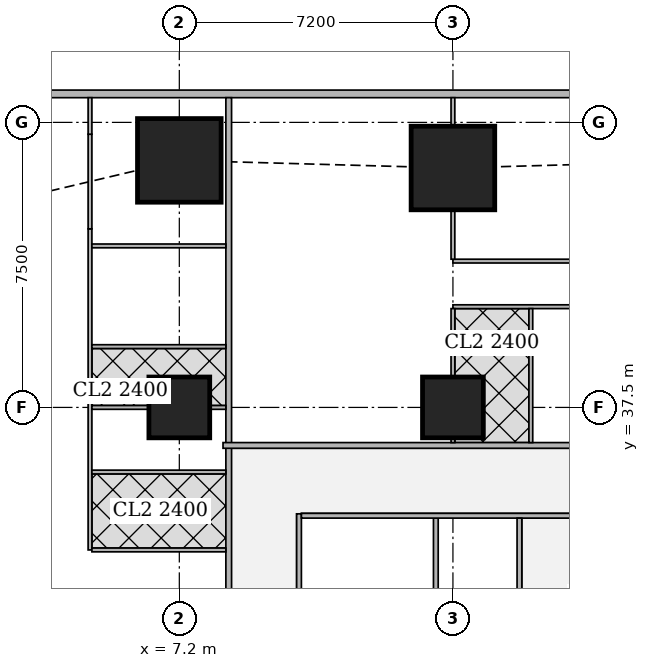
"""IFC4 building model, lengths in metres.
Left out: names, types, materials, properties, quantities, classifications, styles, units other than length and angle.
Written with IfcOpenShell. Run it as: python <this file> out.ifc"""

import sys

from ifc_helpers import new_model, si_unit, direction, frame, frame_2d, origin, origin_2d, place, context, subcontext, project, spatial, rectangle, extrude, element, fill, save


model = new_model("IFC4")
c1 = context("Model", 3, precision=1e-05, world=origin(), true_north=direction((0.0, 1.0)))
c2 = subcontext(c1, "Body", "Model", "MODEL_VIEW")
j1 = project(units=[si_unit("LENGTHUNIT", "METRE"), si_unit("PLANEANGLEUNIT", "RADIAN")], contexts=[c1])
p1 = place(None, origin())
s1 = spatial("IfcSite", under=j1, at=p1, CompositionType="ELEMENT")
p2 = place(p1, origin())
s2 = spatial("IfcBuilding", under=s1, at=p2, CompositionType="ELEMENT")
p3 = place(p2, frame((0.0, 0.0, 89.15)))
s3 = spatial("IfcBuildingStorey", under=s2, at=p3, CompositionType="ELEMENT", Elevation=89.15)
for number, where, z_axis, x_axis in (
    (1, (7.2, 37.5, 0.0), (0.0, 0.0, 1.0), (1.0, 0.0, 0.0)),
    (2, (14.4, 37.5, 0.0), (0.0, 0.0, 1.0), (1.0, 0.0, 0.0)),
):
    element("IfcColumn", number, at=place(p3, frame(where, z_axis=z_axis, x_axis=x_axis)), inside=s3, PredefinedType="COLUMN", context=c2, shape_type="SweptSolid", body=[
        extrude(rectangle(XDim=1.6, YDim=1.6, at=origin_2d()), origin(), (0.0, 0.0, 1.0), 3.75),
    ])
for number, where, z_axis, x_axis in (
    (3, (7.2, 44.0, 0.0), (0.0, 0.0, 1.0), (1.0, 0.0, 0.0)),
    (4, (14.4, 43.8, 0.0), (0.0, 0.0, 1.0), (1.0, 0.0, 0.0)),
):
    element("IfcColumn", number, at=place(p3, frame(where, z_axis=z_axis, x_axis=x_axis)), inside=s3, PredefinedType="COLUMN", context=c2, shape_type="SweptSolid", body=[
        extrude(rectangle(XDim=2.2, YDim=2.2, at=origin_2d()), origin(), (0.0, 0.0, 1.0), 3.75),
    ])
p4 = place(p3, frame((40.106, 45.75, 0.0), z_axis=(0.0, 0.0, 1.0), x_axis=(-1.0, 0.0, 0.0)))
e5 = element("IfcWall", 5, at=p4, inside=s3, PredefinedType="SOLIDWALL", context=c2, shape_type="SweptSolid", body=[
    extrude(rectangle(XDim=37.943, YDim=0.2, at=frame_2d((18.971, 0.0))), origin(), (0.0, 0.0, 1.0), 3.5),
])
p5 = place(p4, frame((8.606, 0.0, 0.9)))
e6 = element("IfcOpeningElement", 6, at=p5, cuts=e5, PredefinedType="OPENING", context=c2, shape_type="SweptSolid", body=[
    extrude(rectangle(XDim=1.8, YDim=1.5, at=frame_2d((0.9, 0.75))), frame((0.0, 0.11, 0.0), z_axis=(0.0, -1.0, 0.0), x_axis=(1.0, 0.0, 0.0)), (0.0, 0.0, 1.0), 0.22),
])
p6 = place(p4, frame((12.206, 0.0, 0.9)))
e7 = element("IfcOpeningElement", 7, at=p6, cuts=e5, PredefinedType="OPENING", context=c2, shape_type="SweptSolid", body=[
    extrude(rectangle(XDim=1.8, YDim=1.5, at=frame_2d((0.9, 0.75))), frame((0.0, 0.11, 0.0), z_axis=(0.0, -1.0, 0.0), x_axis=(1.0, 0.0, 0.0)), (0.0, 0.0, 1.0), 0.22),
])
p7 = place(p4, frame((15.806, 0.0, 0.9)))
e8 = element("IfcOpeningElement", 8, at=p7, cuts=e5, PredefinedType="OPENING", context=c2, shape_type="SweptSolid", body=[
    extrude(rectangle(XDim=1.8, YDim=1.5, at=frame_2d((0.9, 0.75))), frame((0.0, 0.11, 0.0), z_axis=(0.0, -1.0, 0.0), x_axis=(1.0, 0.0, 0.0)), (0.0, 0.0, 1.0), 0.22),
])
p8 = place(p4, frame((19.406, 0.0, 0.9)))
e9 = element("IfcOpeningElement", 9, at=p8, cuts=e5, PredefinedType="OPENING", context=c2, shape_type="SweptSolid", body=[
    extrude(rectangle(XDim=1.8, YDim=1.5, at=frame_2d((0.9, 0.75))), frame((0.0, 0.11, 0.0), z_axis=(0.0, -1.0, 0.0), x_axis=(1.0, 0.0, 0.0)), (0.0, 0.0, 1.0), 0.22),
])
p9 = place(p4, frame((23.006, 0.0, 0.9)))
e10 = element("IfcOpeningElement", 10, at=p9, cuts=e5, PredefinedType="OPENING", context=c2, shape_type="SweptSolid", body=[
    extrude(rectangle(XDim=1.8, YDim=1.5, at=frame_2d((0.9, 0.75))), frame((0.0, 0.11, 0.0), z_axis=(0.0, -1.0, 0.0), x_axis=(1.0, 0.0, 0.0)), (0.0, 0.0, 1.0), 0.22),
])
p10 = place(p4, frame((26.606, 0.0, 0.9)))
e11 = element("IfcOpeningElement", 11, at=p10, cuts=e5, PredefinedType="OPENING", context=c2, shape_type="SweptSolid", body=[
    extrude(rectangle(XDim=1.8, YDim=1.5, at=frame_2d((0.9, 0.75))), frame((0.0, 0.11, 0.0), z_axis=(0.0, -1.0, 0.0), x_axis=(1.0, 0.0, 0.0)), (0.0, 0.0, 1.0), 0.22),
])
p11 = place(p3, frame((8.5, -0.65, 0.0), z_axis=(0.0, 0.0, 1.0), x_axis=(0.0, 1.0, 0.0)))
e12 = element("IfcWall", 12, at=p11, inside=s3, PredefinedType="SOLIDWALL", context=c2, shape_type="SweptSolid", body=[
    extrude(rectangle(XDim=46.3, YDim=0.15, at=frame_2d((23.15, 0.0))), origin(), (0.0, 0.0, 1.0), 2.2),
])
p12 = place(p11, frame((9.525, 0.0, 0.0)))
e13 = element("IfcOpeningElement", 13, at=p12, cuts=e12, PredefinedType="OPENING", context=c2, shape_type="SweptSolid", body=[
    extrude(rectangle(XDim=1.0, YDim=2.1, at=frame_2d((0.5, 1.05))), frame((0.0, 0.085, 0.0), z_axis=(0.0, -1.0, 0.0), x_axis=(1.0, 0.0, 0.0)), (0.0, 0.0, 1.0), 0.17),
])
p13 = place(p11, frame((13.275, 0.0, 0.0)))
e14 = element("IfcOpeningElement", 14, at=p13, cuts=e12, PredefinedType="OPENING", context=c2, shape_type="SweptSolid", body=[
    extrude(rectangle(XDim=1.0, YDim=2.1, at=frame_2d((0.5, 1.05))), frame((0.0, 0.085, 0.0), z_axis=(0.0, -1.0, 0.0), x_axis=(1.0, 0.0, 0.0)), (0.0, 0.0, 1.0), 0.17),
])
p14 = place(p11, frame((20.775, 0.0, 0.0)))
e15 = element("IfcOpeningElement", 15, at=p14, cuts=e12, PredefinedType="OPENING", context=c2, shape_type="SweptSolid", body=[
    extrude(rectangle(XDim=1.0, YDim=2.1, at=frame_2d((0.5, 1.05))), frame((0.0, 0.085, 0.0), z_axis=(0.0, -1.0, 0.0), x_axis=(1.0, 0.0, 0.0)), (0.0, 0.0, 1.0), 0.17),
])
p15 = place(p11, frame((32.025, 0.0, 0.0)))
e16 = element("IfcOpeningElement", 16, at=p15, cuts=e12, PredefinedType="OPENING", context=c2, shape_type="SweptSolid", body=[
    extrude(rectangle(XDim=1.0, YDim=2.1, at=frame_2d((0.5, 1.05))), frame((0.0, 0.085, 0.0), z_axis=(0.0, -1.0, 0.0), x_axis=(1.0, 0.0, 0.0)), (0.0, 0.0, 1.0), 0.17),
])
p16 = place(p3, frame((8.35, 36.5, 0.0), z_axis=(0.0, 0.0, 1.0), x_axis=(1.0, 0.0, 0.0)))
e17 = element("IfcWall", 17, at=p16, inside=s3, PredefinedType="SOLIDWALL", context=c2, shape_type="SweptSolid", body=[
    extrude(rectangle(XDim=26.415, YDim=0.15, at=frame_2d((13.208, 0.0))), origin(), (0.0, 0.0, 1.0), 3.5),
])
p17 = place(p16, frame((2.6, 0.0, 0.0)))
e18 = element("IfcOpeningElement", 18, at=p17, cuts=e17, PredefinedType="OPENING", context=c2, shape_type="SweptSolid", body=[
    extrude(rectangle(XDim=1.0, YDim=2.1, at=frame_2d((0.5, 1.05))), frame((0.0, 0.085, 0.0), z_axis=(0.0, -1.0, 0.0), x_axis=(1.0, 0.0, 0.0)), (0.0, 0.0, 1.0), 0.17),
])
p18 = place(p16, frame((10.75, 0.0, 0.0)))
e19 = element("IfcOpeningElement", 19, at=p18, cuts=e17, PredefinedType="OPENING", context=c2, shape_type="SweptSolid", body=[
    extrude(rectangle(XDim=1.0, YDim=2.1, at=frame_2d((0.5, 1.05))), frame((0.0, 0.085, 0.0), z_axis=(0.0, -1.0, 0.0), x_axis=(1.0, 0.0, 0.0)), (0.0, 0.0, 1.0), 0.17),
])
p19 = place(p16, frame((18.007, 0.0, 0.0)))
e20 = element("IfcOpeningElement", 20, at=p19, cuts=e17, PredefinedType="OPENING", context=c2, shape_type="SweptSolid", body=[
    extrude(rectangle(XDim=1.0, YDim=2.1, at=frame_2d((0.5, 1.05))), frame((0.0, 0.085, 0.0), z_axis=(0.0, -1.0, 0.0), x_axis=(1.0, 0.0, 0.0)), (0.0, 0.0, 1.0), 0.17),
])
p20 = place(p3, frame((4.85, 33.75, 0.0), z_axis=(0.0, 0.0, 1.0), x_axis=(0.0, 1.0, 0.0)))
e21 = element("IfcWall", 21, at=p20, inside=s3, PredefinedType="PARTITIONING", context=c2, shape_type="SweptSolid", body=[
    extrude(rectangle(XDim=8.449, YDim=0.1, at=frame_2d((4.225, 0.0))), origin(), (0.0, 0.0, 1.0), 3.5),
])
p21 = place(p20, frame((0.575, 0.0, 0.0)))
e22 = element("IfcOpeningElement", 22, at=p21, cuts=e21, PredefinedType="OPENING", context=c2, shape_type="SweptSolid", body=[
    extrude(rectangle(XDim=0.9, YDim=2.1, at=frame_2d((0.45, 1.05))), frame((0.0, 0.06, 0.0), z_axis=(0.0, -1.0, 0.0), x_axis=(1.0, 0.0, 0.0)), (0.0, 0.0, 1.0), 0.12),
])
p22 = place(p20, frame((4.1, 0.0, 0.0)))
e23 = element("IfcOpeningElement", 23, at=p22, cuts=e21, PredefinedType="OPENING", context=c2, shape_type="SweptSolid", body=[
    extrude(rectangle(XDim=0.9, YDim=2.1, at=frame_2d((0.45, 1.05))), frame((0.0, 0.06, 0.0), z_axis=(0.0, -1.0, 0.0), x_axis=(1.0, 0.0, 0.0)), (0.0, 0.0, 1.0), 0.12),
])
p23 = place(p20, frame((2.45, 0.0, 0.0)))
e24 = element("IfcOpeningElement", 24, at=p23, cuts=e21, PredefinedType="OPENING", context=c2, shape_type="SweptSolid", body=[
    extrude(rectangle(XDim=0.9, YDim=2.1, at=frame_2d((0.45, 1.05))), frame((0.0, 0.06, 0.0), z_axis=(0.0, -1.0, 0.0), x_axis=(1.0, 0.0, 0.0)), (0.0, 0.0, 1.0), 0.12),
])
p24 = place(p20, frame((5.975, 0.0, 0.0)))
e25 = element("IfcOpeningElement", 25, at=p24, cuts=e21, PredefinedType="OPENING", context=c2, shape_type="SweptSolid", body=[
    extrude(rectangle(XDim=0.9, YDim=2.1, at=frame_2d((0.45, 1.05))), frame((0.0, 0.06, 0.0), z_axis=(0.0, -1.0, 0.0), x_axis=(1.0, 0.0, 0.0)), (0.0, 0.0, 1.0), 0.12),
])
p25 = place(p3, frame((4.85, 42.199, 0.0), z_axis=(0.0, 0.0, 1.0), x_axis=(0.0, 1.0, 0.0)))
e26 = element("IfcWall", 26, at=p25, inside=s3, PredefinedType="PARTITIONING", context=c2, shape_type="SweptSolid", body=[
    extrude(rectangle(XDim=2.49, YDim=0.1, at=frame_2d((1.245, 0.0))), origin(), (0.0, 0.0, 1.0), 2.05),
])
p26 = place(p3, frame((4.85, 44.689, 0.0), z_axis=(0.0, 0.0, 1.0), x_axis=(0.0, 1.0, 0.0)))
e27 = element("IfcWall", 27, at=p26, inside=s3, PredefinedType="PARTITIONING", context=c2, shape_type="SweptSolid", body=[
    extrude(rectangle(XDim=0.961, YDim=0.1, at=frame_2d((0.48, 0.0))), origin(), (0.0, 0.0, 1.0), 3.5),
])
p27 = place(p3, frame((4.9, 33.75, 0.0), z_axis=(0.0, 0.0, 1.0), x_axis=(1.0, 0.0, 0.0)))
e28 = element("IfcWall", 28, at=p27, inside=s3, PredefinedType="PARTITIONING", context=c2, shape_type="SweptSolid", body=[
    extrude(rectangle(XDim=3.525, YDim=0.1, at=frame_2d((1.763, 0.0))), origin(), (0.0, 0.0, 1.0), 3.5),
])
p28 = place(p3, frame((4.9, 37.5, 0.0), z_axis=(0.0, 0.0, 1.0), x_axis=(1.0, 0.0, 0.0)))
e29 = element("IfcWall", 29, at=p28, inside=s3, PredefinedType="PARTITIONING", context=c2, shape_type="SweptSolid", body=[
    extrude(rectangle(XDim=1.499, YDim=0.1, at=frame_2d((0.75, 0.0))), origin(), (0.0, 0.0, 1.0), 3.5),
])
p29 = place(p3, frame((8.001, 37.5, 0.0), z_axis=(0.0, 0.0, 1.0), x_axis=(1.0, 0.0, 0.0)))
e30 = element("IfcWall", 30, at=p29, inside=s3, PredefinedType="PARTITIONING", context=c2, shape_type="SweptSolid", body=[
    extrude(rectangle(XDim=0.424, YDim=0.1, at=frame_2d((0.212, 0.0))), origin(), (0.0, 0.0, 1.0), 3.5),
])
for number, where, z_axis, x_axis in (
    (31, (4.9, 35.8, 0.0), (0.0, 0.0, 1.0), (1.0, 0.0, 0.0)),
    (32, (4.9, 39.1, 0.0), (0.0, 0.0, 1.0), (1.0, 0.0, 0.0)),
):
    element("IfcWall", number, at=place(p3, frame(where, z_axis=z_axis, x_axis=x_axis)), inside=s3, PredefinedType="PARTITIONING", context=c2, shape_type="SweptSolid", body=[
        extrude(rectangle(XDim=3.525, YDim=0.1, at=frame_2d((1.763, 0.0))), origin(), (0.0, 0.0, 1.0), 3.5),
    ])
p30 = place(p3, frame((14.4, 41.35, 0.0), z_axis=(0.0, 0.0, 1.0), x_axis=(1.0, 0.0, 0.0)))
e33 = element("IfcWall", 33, at=p30, inside=s3, PredefinedType="PARTITIONING", context=c2, shape_type="SweptSolid", body=[
    extrude(rectangle(XDim=3.475, YDim=0.1, at=frame_2d((1.738, 0.0))), origin(), (0.0, 0.0, 1.0), 3.5),
])
p31 = place(p30, frame((0.2, 0.0, 0.0)))
e34 = element("IfcOpeningElement", 34, at=p31, cuts=e33, PredefinedType="OPENING", context=c2, shape_type="SweptSolid", body=[
    extrude(rectangle(XDim=0.9, YDim=2.1, at=frame_2d((0.45, 1.05))), frame((0.0, 0.06, 0.0), z_axis=(0.0, -1.0, 0.0), x_axis=(1.0, 0.0, 0.0)), (0.0, 0.0, 1.0), 0.12),
])
p32 = place(p3, frame((14.4, 40.15, 0.0), z_axis=(0.0, 0.0, 1.0), x_axis=(1.0, 0.0, 0.0)))
e35 = element("IfcWall", 35, at=p32, inside=s3, PredefinedType="PARTITIONING", context=c2, shape_type="SweptSolid", body=[
    extrude(rectangle(XDim=3.475, YDim=0.1, at=frame_2d((1.738, 0.0))), origin(), (0.0, 0.0, 1.0), 3.5),
])
p33 = place(p32, frame((0.575, 0.0, 0.0)))
e36 = element("IfcOpeningElement", 36, at=p33, cuts=e35, PredefinedType="OPENING", context=c2, shape_type="SweptSolid", body=[
    extrude(rectangle(XDim=0.9, YDim=2.1, at=frame_2d((0.45, 1.05))), frame((0.0, 0.06, 0.0), z_axis=(0.0, -1.0, 0.0), x_axis=(1.0, 0.0, 0.0)), (0.0, 0.0, 1.0), 0.12),
])
p34 = place(p32, frame((2.375, 0.0, 0.0)))
e37 = element("IfcOpeningElement", 37, at=p34, cuts=e35, PredefinedType="OPENING", context=c2, shape_type="SweptSolid", body=[
    extrude(rectangle(XDim=0.9, YDim=2.1, at=frame_2d((0.45, 1.05))), frame((0.0, 0.06, 0.0), z_axis=(0.0, -1.0, 0.0), x_axis=(1.0, 0.0, 0.0)), (0.0, 0.0, 1.0), 0.12),
])
p35 = place(p3, frame((14.4, 41.4, 0.0), z_axis=(0.0, 0.0, 1.0), x_axis=(0.0, 1.0, 0.0)))
e38 = element("IfcWall", 38, at=p35, inside=s3, PredefinedType="PARTITIONING", context=c2, shape_type="SweptSolid", body=[
    extrude(rectangle(XDim=1.299, YDim=0.1, at=frame_2d((0.649, 0.0))), origin(), (0.0, 0.0, 1.0), 3.5),
])
p36 = place(p3, frame((14.4, 44.901, 0.0), z_axis=(0.0, 0.0, 1.0), x_axis=(0.0, 1.0, 0.0)))
e39 = element("IfcWall", 39, at=p36, inside=s3, PredefinedType="PARTITIONING", context=c2, shape_type="SweptSolid", body=[
    extrude(rectangle(XDim=0.749, YDim=0.1, at=frame_2d((0.375, 0.0))), origin(), (0.0, 0.0, 1.0), 3.5),
])
p37 = place(p3, frame((14.4, 36.575, 0.0), z_axis=(0.0, 0.0, 1.0), x_axis=(0.0, 1.0, 0.0)))
e40 = element("IfcWall", 40, at=p37, inside=s3, PredefinedType="PARTITIONING", context=c2, shape_type="SweptSolid", body=[
    extrude(rectangle(XDim=0.124, YDim=0.1, at=frame_2d((0.062, 0.0))), origin(), (0.0, 0.0, 1.0), 3.5),
])
p38 = place(p3, frame((14.4, 38.301, 0.0), z_axis=(0.0, 0.0, 1.0), x_axis=(0.0, 1.0, 0.0)))
e41 = element("IfcWall", 41, at=p38, inside=s3, PredefinedType="PARTITIONING", context=c2, shape_type="SweptSolid", body=[
    extrude(rectangle(XDim=1.799, YDim=0.1, at=frame_2d((0.899, 0.0))), origin(), (0.0, 0.0, 1.0), 3.5),
])
p39 = place(p3, frame((16.45, 36.575, 0.0), z_axis=(0.0, 0.0, 1.0), x_axis=(0.0, 1.0, 0.0)))
e42 = element("IfcWall", 42, at=p39, inside=s3, PredefinedType="PARTITIONING", context=c2, shape_type="SweptSolid", body=[
    extrude(rectangle(XDim=3.525, YDim=0.1, at=frame_2d((1.763, 0.0))), origin(), (0.0, 0.0, 1.0), 3.5),
])
p40 = place(p3, frame((8.425, 41.75, 0.0), z_axis=(0.0, 0.0, 1.0), x_axis=(-1.0, 0.0, 0.0)))
e43 = element("IfcWall", 43, at=p40, inside=s3, PredefinedType="PARTITIONING", context=c2, shape_type="SweptSolid", body=[
    extrude(rectangle(XDim=3.525, YDim=0.1, at=frame_2d((1.763, 0.0))), origin(), (0.0, 0.0, 1.0), 3.5),
])
p41 = place(p40, frame((2.35, 0.0, 0.0)))
e44 = element("IfcOpeningElement", 44, at=p41, cuts=e43, PredefinedType="OPENING", context=c2, shape_type="SweptSolid", body=[
    extrude(rectangle(XDim=0.9, YDim=2.1, at=frame_2d((0.45, 1.05))), frame((0.0, 0.06, 0.0), z_axis=(0.0, -1.0, 0.0), x_axis=(1.0, 0.0, 0.0)), (0.0, 0.0, 1.0), 0.12),
])
p42 = place(p3, frame((10.35, 10.3, 0.0), z_axis=(0.0, 0.0, 1.0), x_axis=(0.0, 1.0, 0.0)))
e45 = element("IfcWall", 45, at=p42, inside=s3, PredefinedType="PARTITIONING", context=c2, shape_type="SweptSolid", body=[
    extrude(rectangle(XDim=24.4, YDim=0.125, at=frame_2d((12.2, 0.0))), origin(), (0.0, 0.0, 1.0), 3.5),
])
p43 = place(p42, frame((1.55, 0.0, 0.0)))
e46 = element("IfcOpeningElement", 46, at=p43, cuts=e45, PredefinedType="OPENING", context=c2, shape_type="SweptSolid", body=[
    extrude(rectangle(XDim=1.0, YDim=2.1, at=frame_2d((0.5, 1.05))), frame((0.0, 0.073, 0.0), z_axis=(0.0, -1.0, 0.0), x_axis=(1.0, 0.0, 0.0)), (0.0, 0.0, 1.0), 0.145),
])
p44 = place(p42, frame((6.6, 0.0, 0.0)))
e47 = element("IfcOpeningElement", 47, at=p44, cuts=e45, PredefinedType="OPENING", context=c2, shape_type="SweptSolid", body=[
    extrude(rectangle(XDim=1.0, YDim=2.1, at=frame_2d((0.5, 1.05))), frame((0.0, 0.073, 0.0), z_axis=(0.0, -1.0, 0.0), x_axis=(1.0, 0.0, 0.0)), (0.0, 0.0, 1.0), 0.145),
])
p45 = place(p42, frame((11.4, 0.0, 0.0)))
e48 = element("IfcOpeningElement", 48, at=p45, cuts=e45, PredefinedType="OPENING", context=c2, shape_type="SweptSolid", body=[
    extrude(rectangle(XDim=1.0, YDim=2.1, at=frame_2d((0.5, 1.05))), frame((0.0, 0.073, 0.0), z_axis=(0.0, -1.0, 0.0), x_axis=(1.0, 0.0, 0.0)), (0.0, 0.0, 1.0), 0.145),
])
p46 = place(p42, frame((18.55, 0.0, 0.0)))
e49 = element("IfcOpeningElement", 49, at=p46, cuts=e45, PredefinedType="OPENING", context=c2, shape_type="SweptSolid", body=[
    extrude(rectangle(XDim=1.0, YDim=2.1, at=frame_2d((0.5, 1.05))), frame((0.0, 0.073, 0.0), z_axis=(0.0, -1.0, 0.0), x_axis=(1.0, 0.0, 0.0)), (0.0, 0.0, 1.0), 0.145),
])
p47 = place(p3, frame((13.95, 30.45, 0.0), z_axis=(0.0, 0.0, 1.0), x_axis=(0.0, 1.0, 0.0)))
e50 = element("IfcWall", 50, at=p47, inside=s3, PredefinedType="PARTITIONING", context=c2, shape_type="SweptSolid", body=[
    extrude(rectangle(XDim=4.137, YDim=0.125, at=frame_2d((2.068, 0.0))), origin(), (0.0, 0.0, 1.0), 3.5),
])
p48 = place(p3, frame((10.413, 34.65, 0.0), z_axis=(0.0, 0.0, 1.0), x_axis=(1.0, 0.0, 0.0)))
e51 = element("IfcWall", 51, at=p48, inside=s3, PredefinedType="PARTITIONING", context=c2, shape_type="SweptSolid", body=[
    extrude(rectangle(XDim=10.837, YDim=0.125, at=frame_2d((5.418, 0.0))), origin(), (0.0, 0.0, 1.0), 3.5),
])
p49 = place(p48, frame((7.487, 0.0, 0.0)))
e52 = element("IfcOpeningElement", 52, at=p49, cuts=e51, PredefinedType="OPENING", context=c2, shape_type="SweptSolid", body=[
    extrude(rectangle(XDim=1.8, YDim=2.1, at=frame_2d((0.9, 1.05))), frame((0.0, 0.073, 0.0), z_axis=(0.0, -1.0, 0.0), x_axis=(1.0, 0.0, 0.0)), (0.0, 0.0, 1.0), 0.145),
])
p50 = place(p3, frame((16.15, 30.45, 0.0), z_axis=(0.0, 0.0, 1.0), x_axis=(0.0, 1.0, 0.0)))
e53 = element("IfcWall", 53, at=p50, inside=s3, PredefinedType="PARTITIONING", context=c2, shape_type="SweptSolid", body=[
    extrude(rectangle(XDim=4.137, YDim=0.125, at=frame_2d((2.068, 0.0))), origin(), (0.0, 0.0, 1.0), 3.5),
])
p51 = place(p50, frame((1.625, 0.0, 0.0)))
e54 = element("IfcOpeningElement", 54, at=p51, cuts=e53, PredefinedType="OPENING", context=c2, shape_type="SweptSolid", body=[
    extrude(rectangle(XDim=1.0, YDim=2.1, at=frame_2d((0.5, 1.05))), frame((0.0, 0.073, 0.0), z_axis=(0.0, -1.0, 0.0), x_axis=(1.0, 0.0, 0.0)), (0.0, 0.0, 1.0), 0.145),
])
p52 = place(p9, origin())
e55 = element("IfcWindow", 55, at=p52, inside=s3, PartitioningType="SINGLE_PANEL", PredefinedType="WINDOW", context=c2, shape_type="SweptSolid", body=[
    extrude(rectangle(XDim=1.8, YDim=1.5, at=frame_2d((0.9, 0.75))), frame((0.0, 0.03, 0.0), z_axis=(0.0, -1.0, 0.0), x_axis=(1.0, 0.0, 0.0)), (0.0, 0.0, 1.0), 0.06),
])
fill(e10, e55)
p53 = place(p10, origin())
e56 = element("IfcWindow", 56, at=p53, inside=s3, PartitioningType="SINGLE_PANEL", PredefinedType="WINDOW", context=c2, shape_type="SweptSolid", body=[
    extrude(rectangle(XDim=1.8, YDim=1.5, at=frame_2d((0.9, 0.75))), frame((0.0, 0.03, 0.0), z_axis=(0.0, -1.0, 0.0), x_axis=(1.0, 0.0, 0.0)), (0.0, 0.0, 1.0), 0.06),
])
fill(e11, e56)
p54 = place(p21, origin())
e57 = element("IfcDoor", 57, at=p54, inside=s3, OperationType="SINGLE_SWING_RIGHT", PredefinedType="DOOR", context=c2, shape_type="SweptSolid", body=[
    extrude(rectangle(XDim=0.9, YDim=2.1, at=frame_2d((0.45, 1.05))), frame((0.0, 0.025, 0.0), z_axis=(0.0, -1.0, 0.0), x_axis=(1.0, 0.0, 0.0)), (0.0, 0.0, 1.0), 0.05),
])
fill(e22, e57)
p55 = place(p22, origin())
e58 = element("IfcDoor", 58, at=p55, inside=s3, OperationType="SINGLE_SWING_LEFT", PredefinedType="DOOR", context=c2, shape_type="SweptSolid", body=[
    extrude(rectangle(XDim=0.9, YDim=2.1, at=frame_2d((0.45, 1.05))), frame((0.0, 0.025, 0.0), z_axis=(0.0, -1.0, 0.0), x_axis=(1.0, 0.0, 0.0)), (0.0, 0.0, 1.0), 0.05),
])
fill(e23, e58)
p56 = place(p23, origin())
e59 = element("IfcDoor", 59, at=p56, inside=s3, OperationType="SINGLE_SWING_RIGHT", PredefinedType="DOOR", context=c2, shape_type="SweptSolid", body=[
    extrude(rectangle(XDim=0.9, YDim=2.1, at=frame_2d((0.45, 1.05))), frame((0.0, 0.025, 0.0), z_axis=(0.0, -1.0, 0.0), x_axis=(1.0, 0.0, 0.0)), (0.0, 0.0, 1.0), 0.05),
])
fill(e24, e59)
p57 = place(p24, origin())
e60 = element("IfcDoor", 60, at=p57, inside=s3, OperationType="SINGLE_SWING_RIGHT", PredefinedType="DOOR", context=c2, shape_type="SweptSolid", body=[
    extrude(rectangle(XDim=0.9, YDim=2.1, at=frame_2d((0.45, 1.05))), frame((0.0, 0.025, 0.0), z_axis=(0.0, -1.0, 0.0), x_axis=(1.0, 0.0, 0.0)), (0.0, 0.0, 1.0), 0.05),
])
fill(e25, e60)
p58 = place(p31, origin())
e61 = element("IfcDoor", 61, at=p58, inside=s3, OperationType="SINGLE_SWING_LEFT", PredefinedType="DOOR", context=c2, shape_type="SweptSolid", body=[
    extrude(rectangle(XDim=0.9, YDim=2.1, at=frame_2d((0.45, 1.05))), frame((0.0, 0.025, 0.0), z_axis=(0.0, -1.0, 0.0), x_axis=(1.0, 0.0, 0.0)), (0.0, 0.0, 1.0), 0.05),
])
fill(e34, e61)
p59 = place(p33, origin())
e62 = element("IfcDoor", 62, at=p59, inside=s3, OperationType="SINGLE_SWING_RIGHT", PredefinedType="DOOR", context=c2, shape_type="SweptSolid", body=[
    extrude(rectangle(XDim=0.9, YDim=2.1, at=frame_2d((0.45, 1.05))), frame((0.0, 0.025, 0.0), z_axis=(0.0, -1.0, 0.0), x_axis=(1.0, 0.0, 0.0)), (0.0, 0.0, 1.0), 0.05),
])
fill(e36, e62)
p60 = place(p34, origin())
e63 = element("IfcDoor", 63, at=p60, inside=s3, OperationType="SINGLE_SWING_LEFT", PredefinedType="DOOR", context=c2, shape_type="SweptSolid", body=[
    extrude(rectangle(XDim=0.9, YDim=2.1, at=frame_2d((0.45, 1.05))), frame((0.0, 0.025, 0.0), z_axis=(0.0, -1.0, 0.0), x_axis=(1.0, 0.0, 0.0)), (0.0, 0.0, 1.0), 0.05),
])
fill(e37, e63)
p61 = place(p17, origin())
e64 = element("IfcDoor", 64, at=p61, inside=s3, OperationType="SINGLE_SWING_LEFT", PredefinedType="DOOR", context=c2, shape_type="SweptSolid", body=[
    extrude(rectangle(XDim=1.0, YDim=2.1, at=frame_2d((0.5, 1.05))), frame((0.0, 0.025, 0.0), z_axis=(0.0, -1.0, 0.0), x_axis=(1.0, 0.0, 0.0)), (0.0, 0.0, 1.0), 0.05),
])
fill(e18, e64)
p62 = place(p41, origin())
e65 = element("IfcDoor", 65, at=p62, inside=s3, OperationType="SINGLE_SWING_LEFT", PredefinedType="DOOR", context=c2, shape_type="SweptSolid", body=[
    extrude(rectangle(XDim=0.9, YDim=2.1, at=frame_2d((0.45, 1.05))), frame((0.0, 0.025, 0.0), z_axis=(0.0, -1.0, 0.0), x_axis=(1.0, 0.0, 0.0)), (0.0, 0.0, 1.0), 0.05),
])
fill(e44, e65)
p63 = place(p51, origin())
e66 = element("IfcDoor", 66, at=p63, inside=s3, OperationType="SINGLE_SWING_RIGHT", PredefinedType="DOOR", context=c2, shape_type="SweptSolid", body=[
    extrude(rectangle(XDim=1.0, YDim=2.1, at=frame_2d((0.5, 1.05))), frame((0.0, 0.025, 0.0), z_axis=(0.0, -1.0, 0.0), x_axis=(1.0, 0.0, 0.0)), (0.0, 0.0, 1.0), 0.05),
])
fill(e54, e66)
save(model, sys.argv[1])
